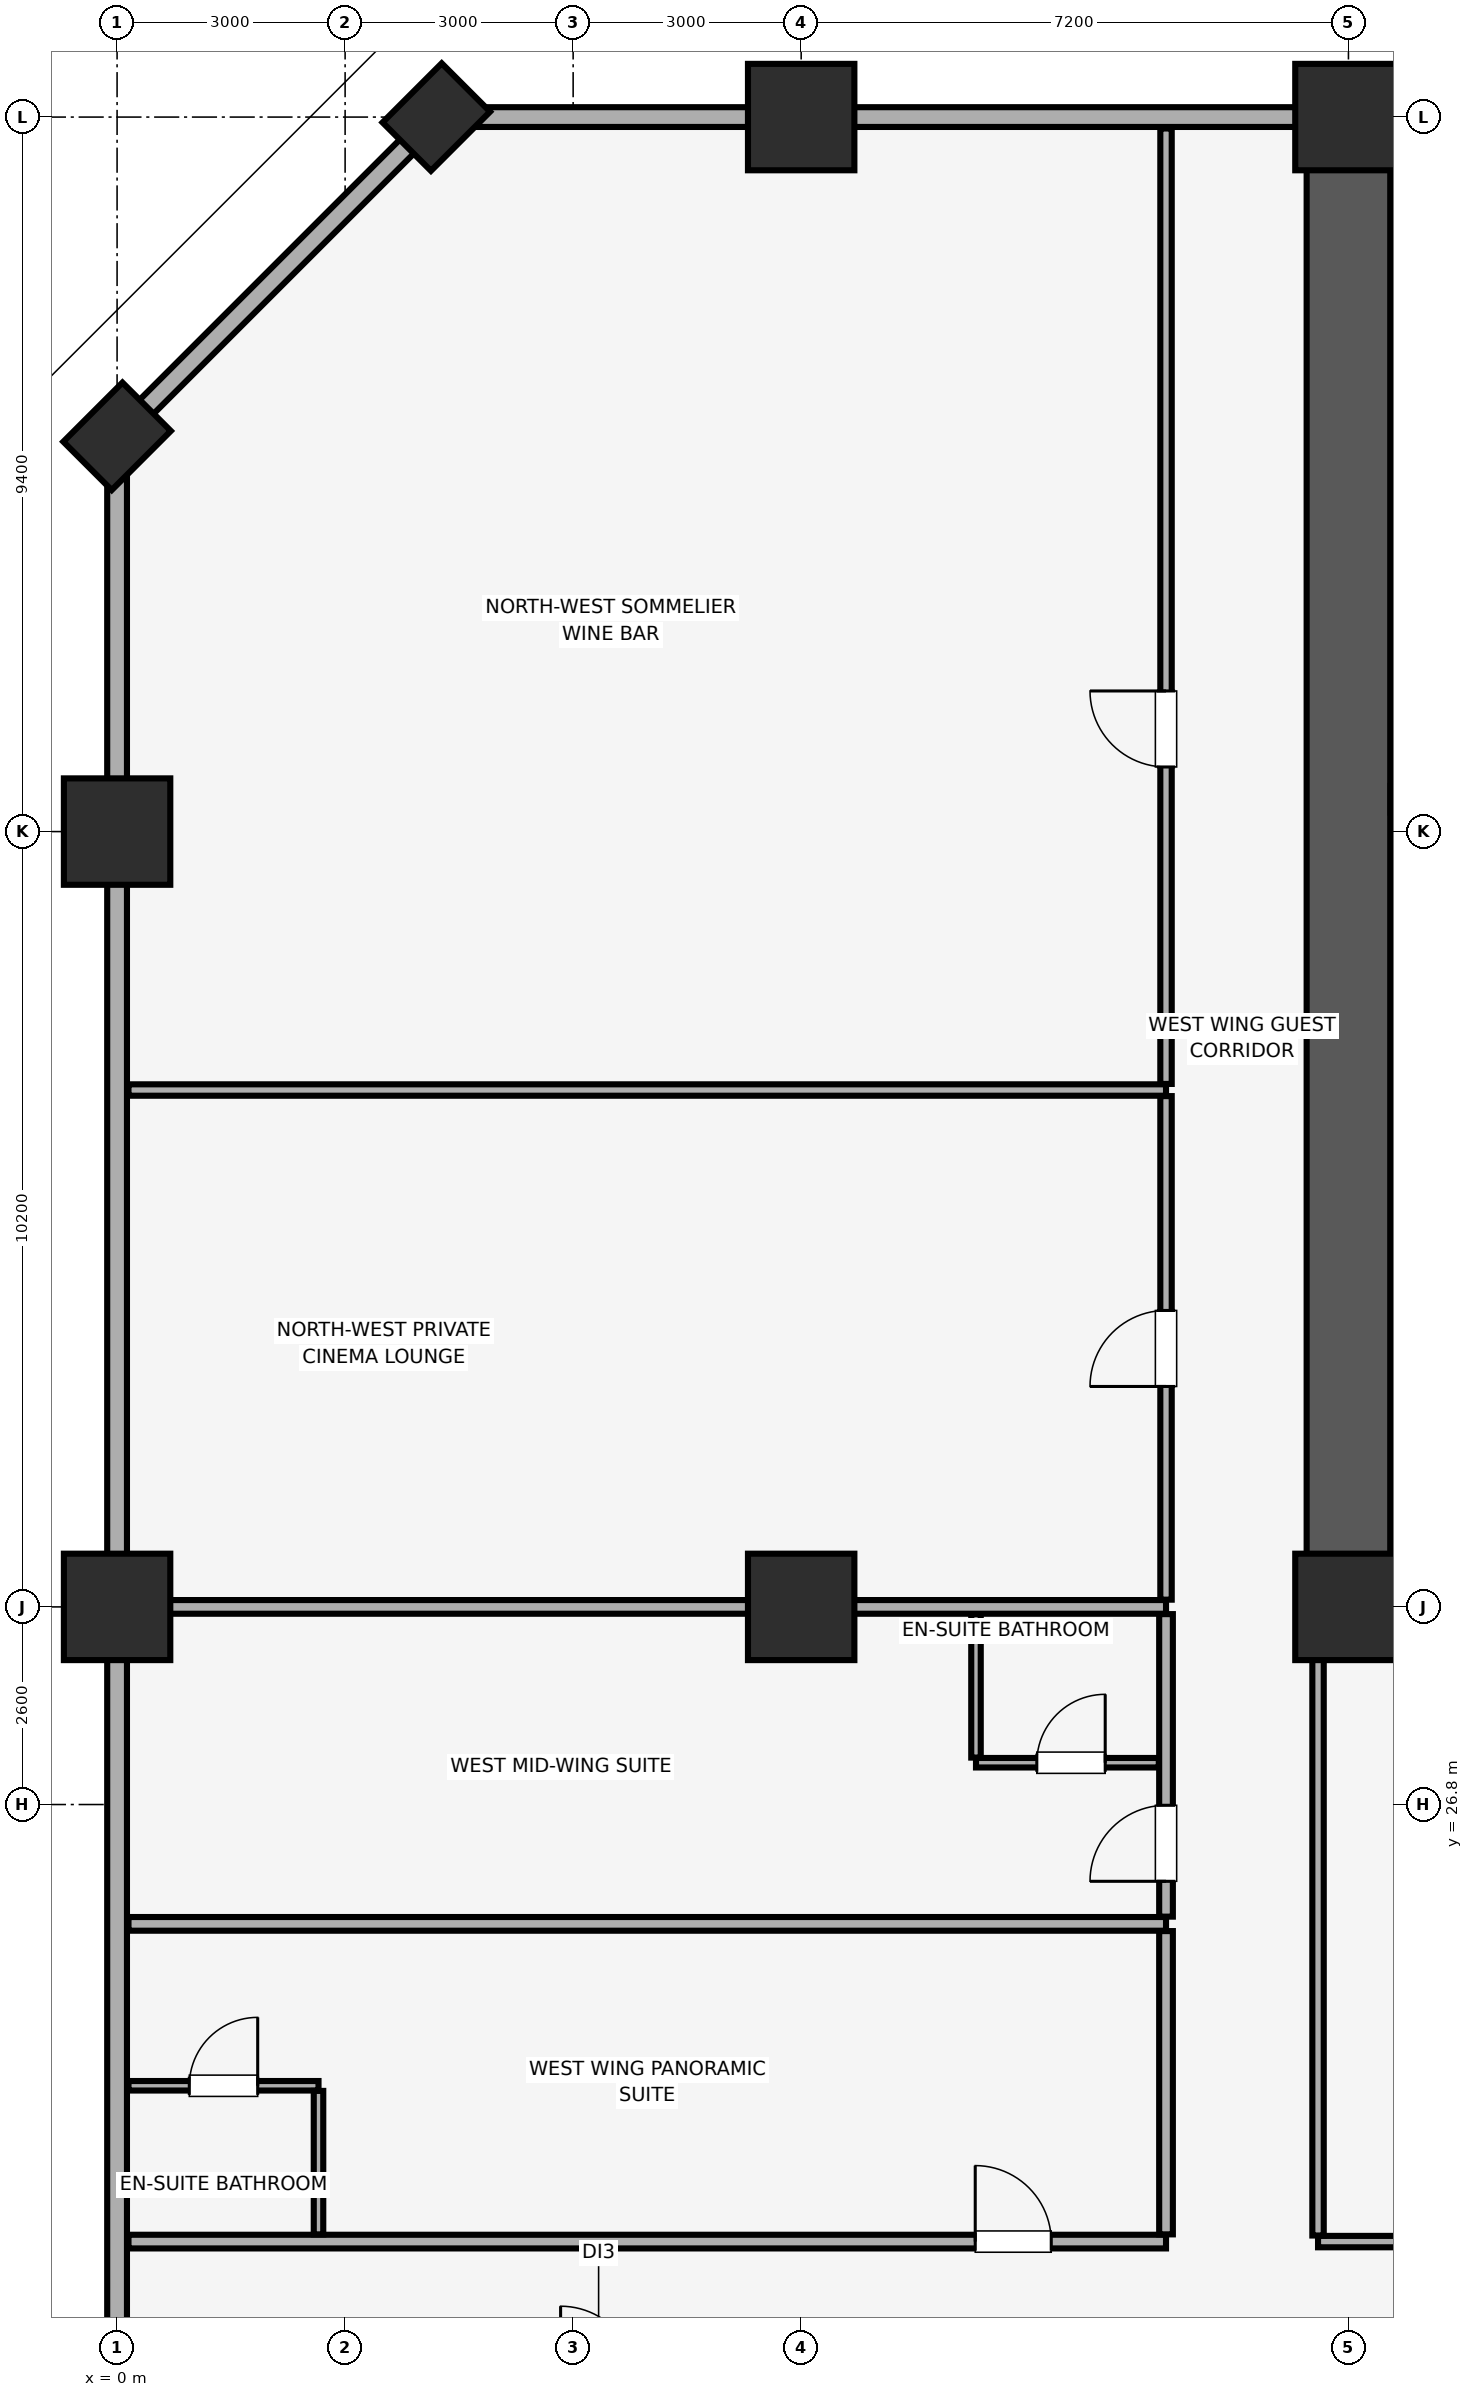
"""IFC4 building model, lengths in metres.
Left out: names, types, materials, properties, quantities, classifications, styles, units other than length and angle.
Written with IfcOpenShell. Run it as: python <this file> out.ifc"""

import sys

from ifc_helpers import new_model, si_unit, direction, frame, frame_2d, origin, origin_2d, place, context, subcontext, project, spatial, rectangle, extrude, element, fill, save


model = new_model("IFC4")
c1 = context("Model", 3, precision=1e-05, world=origin(), true_north=direction((0.0, 1.0)))
c2 = subcontext(c1, "Body", "Model", "MODEL_VIEW")
j1 = project(units=[si_unit("LENGTHUNIT", "METRE"), si_unit("PLANEANGLEUNIT", "RADIAN")], contexts=[c1])
p1 = place(None, origin())
s1 = spatial("IfcSite", under=j1, at=p1, CompositionType="ELEMENT")
p2 = place(p1, origin())
s2 = spatial("IfcBuilding", under=s1, at=p2, CompositionType="ELEMENT")
p3 = place(p2, frame((0.0, 0.0, 76.4)))
s3 = spatial("IfcBuildingStorey", under=s2, at=p3, CompositionType="ELEMENT", Elevation=76.4)
for number, where, z_axis, x_axis in (
    (1, (0.0, 29.4, 0.0), (0.0, 0.0, 1.0), (1.0, 0.0, 0.0)),
    (2, (0.0, 39.6, 0.0), (0.0, 0.0, 1.0), (1.0, 0.0, 0.0)),
):
    element("IfcColumn", number, at=place(p3, frame(where, z_axis=z_axis, x_axis=x_axis)), inside=s3, PredefinedType="COLUMN", context=c2, shape_type="SweptSolid", body=[
        extrude(rectangle(XDim=1.4, YDim=1.4, at=origin_2d()), origin(), (0.0, 0.0, 1.0), 3.4),
    ])
for number, where, z_axis, x_axis in (
    (3, (4.2, 49.0, 0.0), (0.0, 0.0, 1.0), (0.707, 0.707, 0.0)),
    (4, (0.0, 44.8, 0.0), (0.0, 0.0, 1.0), (0.707, 0.707, 0.0)),
):
    element("IfcColumn", number, at=place(p3, frame(where, z_axis=z_axis, x_axis=x_axis)), inside=s3, PredefinedType="PILASTER", context=c2, shape_type="SweptSolid", body=[
        extrude(rectangle(XDim=1.1, YDim=0.9, at=origin_2d()), origin(), (0.0, 0.0, 1.0), 3.4),
    ])
for number, where, z_axis, x_axis in (
    (5, (9.0, 29.4, 0.0), (0.0, 0.0, 1.0), (1.0, 0.0, 0.0)),
    (6, (9.0, 49.0, 0.0), (0.0, 0.0, 1.0), (1.0, 0.0, 0.0)),
    (7, (16.2, 29.4, 0.0), (0.0, 0.0, 1.0), (1.0, 0.0, 0.0)),
    (8, (16.2, 49.0, 0.0), (0.0, 0.0, 1.0), (1.0, 0.0, 0.0)),
):
    element("IfcColumn", number, at=place(p3, frame(where, z_axis=z_axis, x_axis=x_axis)), inside=s3, PredefinedType="COLUMN", context=c2, shape_type="SweptSolid", body=[
        extrude(rectangle(XDim=1.4, YDim=1.4, at=origin_2d()), origin(), (0.0, 0.0, 1.0), 3.4),
    ])
p4 = place(p3, frame((79.8, 49.0, 0.0), z_axis=(0.0, 0.0, 1.0), x_axis=(-1.0, 0.0, 0.0)))
e9 = element("IfcWall", 9, at=p4, inside=s3, PredefinedType="SOLIDWALL", context=c2, shape_type="SweptSolid", body=[
    extrude(rectangle(XDim=75.6, YDim=0.26, at=frame_2d((37.8, 0.0))), origin(), (0.0, 0.0, 1.0), 2.45),
])
p5 = place(p3, frame((4.2, 49.0, 0.0), z_axis=(0.0, 0.0, 1.0), x_axis=(-0.707106781187, -0.707106781187, 0.0)))
e10 = element("IfcWall", 10, at=p5, inside=s3, PredefinedType="SOLIDWALL", context=c2, shape_type="SweptSolid", body=[
    extrude(rectangle(XDim=5.94, YDim=0.26, at=frame_2d((2.97, 0.0))), origin(), (0.0, 0.0, 1.0), 2.45),
])
p6 = place(p3, frame((0.0, 44.8, 0.0), z_axis=(0.0, 0.0, 1.0), x_axis=(0.0, -1.0, 0.0)))
e11 = element("IfcWall", 11, at=p6, inside=s3, PredefinedType="SOLIDWALL", context=c2, shape_type="SweptSolid", body=[
    extrude(rectangle(XDim=40.6, YDim=0.26, at=frame_2d((20.3, 0.0))), origin(), (0.0, 0.0, 1.0), 2.45),
])
p7 = place(p3, frame((16.2, 29.4, 0.0), z_axis=(0.0, 0.0, 1.0), x_axis=(0.0, 1.0, 0.0)))
e12 = element("IfcWall", 12, at=p7, inside=s3, PredefinedType="SHEAR", context=c2, shape_type="SweptSolid", body=[
    extrude(rectangle(XDim=19.2, YDim=1.1, at=frame_2d((9.6, 0.0))), origin(), (0.0, 0.0, 1.0), 3.4),
])
p8 = place(p3, frame((16.755, 29.4, 0.0), z_axis=(0.0, 0.0, 1.0), x_axis=(1.0, 0.0, 0.0)))
e13 = element("IfcWall", 13, at=p8, inside=s3, PredefinedType="SHEAR", context=c2, shape_type="SweptSolid", body=[
    extrude(rectangle(XDim=6.845, YDim=1.1, at=frame_2d((3.423, 0.0))), origin(), (0.0, 0.0, 1.0), 3.4),
])
p9 = place(p3, frame((16.755, 40.025, 0.0), z_axis=(0.0, 0.0, 1.0), x_axis=(1.0, 0.0, 0.0)))
e14 = element("IfcWall", 14, at=p9, inside=s3, PredefinedType="SHEAR", context=c2, shape_type="SweptSolid", body=[
    extrude(rectangle(XDim=4.1, YDim=0.35, at=frame_2d((2.05, 0.0))), origin(), (0.0, 0.0, 1.0), 3.4),
])
p10 = place(p9, frame((1.71, 0.0, 0.0)))
e15 = element("IfcOpeningElement", 15, at=p10, cuts=e14, PredefinedType="OPENING", context=c2, shape_type="SweptSolid", body=[
    extrude(rectangle(XDim=1.15, YDim=2.15, at=frame_2d((0.575, 1.075))), frame((0.0, 0.185, 0.0), z_axis=(0.0, -1.0, 0.0), x_axis=(1.0, 0.0, 0.0)), (0.0, 0.0, 1.0), 0.37),
])
p11 = place(p3, frame((15.8, 21.05, 0.0), z_axis=(0.0, 0.0, 1.0), x_axis=(1.0, 0.0, 0.0)))
e16 = element("IfcWall", 16, at=p11, inside=s3, PredefinedType="PARTITIONING", context=c2, shape_type="SweptSolid", body=[
    extrude(rectangle(XDim=9.4, YDim=0.15, at=frame_2d((4.7, 0.0))), origin(), (0.0, 0.0, 1.0), 3.4),
])
p12 = place(p11, frame((4.2, 0.0, 0.0)))
e17 = element("IfcOpeningElement", 17, at=p12, cuts=e16, PredefinedType="OPENING", context=c2, shape_type="SweptSolid", body=[
    extrude(rectangle(XDim=1.0, YDim=2.15, at=frame_2d((0.5, 1.075))), frame((0.0, 0.085, 0.0), z_axis=(0.0, -1.0, 0.0), x_axis=(1.0, 0.0, 0.0)), (0.0, 0.0, 1.0), 0.17),
])
p13 = place(p3, frame((15.8, 21.13, 0.0), z_axis=(0.0, 0.0, 1.0), x_axis=(0.0, 1.0, 0.0)))
e18 = element("IfcWall", 18, at=p13, inside=s3, PredefinedType="PARTITIONING", context=c2, shape_type="SweptSolid", body=[
    extrude(rectangle(XDim=8.26, YDim=0.15, at=frame_2d((4.13, 0.0))), origin(), (0.0, 0.0, 1.0), 3.4),
])
p14 = place(p3, frame((0.15, 21.05, 0.0), z_axis=(0.0, 0.0, 1.0), x_axis=(1.0, 0.0, 0.0)))
e19 = element("IfcWall", 19, at=p14, inside=s3, PredefinedType="PARTITIONING", context=c2, shape_type="SweptSolid", body=[
    extrude(rectangle(XDim=13.65, YDim=0.18, at=frame_2d((6.825, 0.0))), origin(), (0.0, 0.0, 1.0), 3.4),
])
p15 = place(p14, frame((11.14, 0.0, 0.0)))
e20 = element("IfcOpeningElement", 20, at=p15, cuts=e19, PredefinedType="OPENING", context=c2, shape_type="SweptSolid", body=[
    extrude(rectangle(XDim=1.0, YDim=2.15, at=frame_2d((0.5, 1.075))), frame((0.0, 0.1, 0.0), z_axis=(0.0, -1.0, 0.0), x_axis=(1.0, 0.0, 0.0)), (0.0, 0.0, 1.0), 0.2),
])
p16 = place(p3, frame((0.15, 25.23, 0.0), z_axis=(0.0, 0.0, 1.0), x_axis=(1.0, 0.0, 0.0)))
e21 = element("IfcWall", 21, at=p16, inside=s3, PredefinedType="PARTITIONING", context=c2, shape_type="SweptSolid", body=[
    extrude(rectangle(XDim=13.65, YDim=0.18, at=frame_2d((6.825, 0.0))), origin(), (0.0, 0.0, 1.0), 3.4),
])
p17 = place(p3, frame((13.8, 21.145, 0.0), z_axis=(0.0, 0.0, 1.0), x_axis=(0.0, 1.0, 0.0)))
e22 = element("IfcWall", 22, at=p17, inside=s3, PredefinedType="PARTITIONING", context=c2, shape_type="SweptSolid", body=[
    extrude(rectangle(XDim=3.99, YDim=0.18, at=frame_2d((1.995, 0.0))), origin(), (0.0, 0.0, 1.0), 3.4),
])
p18 = place(p3, frame((0.15, 23.1, 0.0), z_axis=(0.0, 0.0, 1.0), x_axis=(1.0, 0.0, 0.0)))
e23 = element("IfcWall", 23, at=p18, inside=s3, PredefinedType="PARTITIONING", context=c2, shape_type="SweptSolid", body=[
    extrude(rectangle(XDim=2.5, YDim=0.125, at=frame_2d((1.25, 0.0))), origin(), (0.0, 0.0, 1.0), 3.4),
])
p19 = place(p18, frame((0.8, 0.0, 0.0)))
e24 = element("IfcOpeningElement", 24, at=p19, cuts=e23, PredefinedType="OPENING", context=c2, shape_type="SweptSolid", body=[
    extrude(rectangle(XDim=0.9, YDim=2.1, at=frame_2d((0.45, 1.05))), frame((0.0, 0.073, 0.0), z_axis=(0.0, -1.0, 0.0), x_axis=(1.0, 0.0, 0.0)), (0.0, 0.0, 1.0), 0.145),
])
p20 = place(p3, frame((2.65, 21.145, 0.0), z_axis=(0.0, 0.0, 1.0), x_axis=(0.0, 1.0, 0.0)))
e25 = element("IfcWall", 25, at=p20, inside=s3, PredefinedType="PARTITIONING", context=c2, shape_type="SweptSolid", body=[
    extrude(rectangle(XDim=1.887, YDim=0.125, at=frame_2d((0.944, 0.0))), origin(), (0.0, 0.0, 1.0), 3.4),
])
p21 = place(p3, frame((0.15, 29.4, 0.0), z_axis=(0.0, 0.0, 1.0), x_axis=(1.0, 0.0, 0.0)))
e26 = element("IfcWall", 26, at=p21, inside=s3, PredefinedType="PARTITIONING", context=c2, shape_type="SweptSolid", body=[
    extrude(rectangle(XDim=13.65, YDim=0.18, at=frame_2d((6.825, 0.0))), origin(), (0.0, 0.0, 1.0), 2.49),
])
p22 = place(p3, frame((13.8, 25.325, 0.0), z_axis=(0.0, 0.0, 1.0), x_axis=(0.0, 1.0, 0.0)))
e27 = element("IfcWall", 27, at=p22, inside=s3, PredefinedType="PARTITIONING", context=c2, shape_type="SweptSolid", body=[
    extrude(rectangle(XDim=3.98, YDim=0.18, at=frame_2d((1.99, 0.0))), origin(), (0.0, 0.0, 1.0), 3.4),
])
p23 = place(p22, frame((0.465, 0.0, 0.0)))
e28 = element("IfcOpeningElement", 28, at=p23, cuts=e27, PredefinedType="OPENING", context=c2, shape_type="SweptSolid", body=[
    extrude(rectangle(XDim=1.0, YDim=2.15, at=frame_2d((0.5, 1.075))), frame((0.0, 0.1, 0.0), z_axis=(0.0, -1.0, 0.0), x_axis=(1.0, 0.0, 0.0)), (0.0, 0.0, 1.0), 0.2),
])
p24 = place(p3, frame((11.3, 27.35, 0.0), z_axis=(0.0, 0.0, 1.0), x_axis=(1.0, 0.0, 0.0)))
e29 = element("IfcWall", 29, at=p24, inside=s3, PredefinedType="PARTITIONING", context=c2, shape_type="SweptSolid", body=[
    extrude(rectangle(XDim=2.405, YDim=0.125, at=frame_2d((1.203, 0.0))), origin(), (0.0, 0.0, 1.0), 3.4),
])
p25 = place(p24, frame((0.8, 0.0, 0.0)))
e30 = element("IfcOpeningElement", 30, at=p25, cuts=e29, PredefinedType="OPENING", context=c2, shape_type="SweptSolid", body=[
    extrude(rectangle(XDim=0.9, YDim=2.1, at=frame_2d((0.45, 1.05))), frame((0.0, 0.073, 0.0), z_axis=(0.0, -1.0, 0.0), x_axis=(1.0, 0.0, 0.0)), (0.0, 0.0, 1.0), 0.145),
])
p26 = place(p3, frame((11.3, 27.417, 0.0), z_axis=(0.0, 0.0, 1.0), x_axis=(0.0, 1.0, 0.0)))
e31 = element("IfcWall", 31, at=p26, inside=s3, PredefinedType="PARTITIONING", context=c2, shape_type="SweptSolid", body=[
    extrude(rectangle(XDim=1.887, YDim=0.125, at=frame_2d((0.944, 0.0))), origin(), (0.0, 0.0, 1.0), 3.4),
])
p27 = place(p3, frame((0.15, 36.2, 0.0), z_axis=(0.0, 0.0, 1.0), x_axis=(1.0, 0.0, 0.0)))
e32 = element("IfcWall", 32, at=p27, inside=s3, PredefinedType="PARTITIONING", context=c2, shape_type="SweptSolid", body=[
    extrude(rectangle(XDim=13.65, YDim=0.15, at=frame_2d((6.825, 0.0))), origin(), (0.0, 0.0, 1.0), 3.4),
])
p28 = place(p3, frame((13.8, 29.495, 0.0), z_axis=(0.0, 0.0, 1.0), x_axis=(0.0, 1.0, 0.0)))
e33 = element("IfcWall", 33, at=p28, inside=s3, PredefinedType="PARTITIONING", context=c2, shape_type="SweptSolid", body=[
    extrude(rectangle(XDim=6.625, YDim=0.15, at=frame_2d((3.312, 0.0))), origin(), (0.0, 0.0, 1.0), 3.4),
])
p29 = place(p28, frame((2.805, 0.0, 0.0)))
e34 = element("IfcOpeningElement", 34, at=p29, cuts=e33, PredefinedType="OPENING", context=c2, shape_type="SweptSolid", body=[
    extrude(rectangle(XDim=1.0, YDim=2.15, at=frame_2d((0.5, 1.075))), frame((0.0, 0.085, 0.0), z_axis=(0.0, -1.0, 0.0), x_axis=(1.0, 0.0, 0.0)), (0.0, 0.0, 1.0), 0.17),
])
p30 = place(p3, frame((13.8, 36.28, 0.0), z_axis=(0.0, 0.0, 1.0), x_axis=(0.0, 1.0, 0.0)))
e35 = element("IfcWall", 35, at=p30, inside=s3, PredefinedType="PARTITIONING", context=c2, shape_type="SweptSolid", body=[
    extrude(rectangle(XDim=12.57, YDim=0.15, at=frame_2d((6.285, 0.0))), origin(), (0.0, 0.0, 1.0), 3.4),
])
p31 = place(p30, frame((4.17, 0.0, 0.0)))
e36 = element("IfcOpeningElement", 36, at=p31, cuts=e35, PredefinedType="OPENING", context=c2, shape_type="SweptSolid", body=[
    extrude(rectangle(XDim=1.0, YDim=2.15, at=frame_2d((0.5, 1.075))), frame((0.0, 0.085, 0.0), z_axis=(0.0, -1.0, 0.0), x_axis=(1.0, 0.0, 0.0)), (0.0, 0.0, 1.0), 0.17),
])
p32 = place(p15, origin())
e37 = element("IfcDoor", 37, at=p32, inside=s3, OperationType="SINGLE_SWING_LEFT", PredefinedType="DOOR", context=c2, shape_type="SweptSolid", body=[
    extrude(rectangle(XDim=1.0, YDim=2.15, at=frame_2d((0.5, 1.075))), frame((0.0, 0.025, 0.0), z_axis=(0.0, -1.0, 0.0), x_axis=(1.0, 0.0, 0.0)), (0.0, 0.0, 1.0), 0.05),
])
fill(e20, e37)
p33 = place(p19, origin())
e38 = element("IfcDoor", 38, at=p33, inside=s3, OperationType="SINGLE_SWING_RIGHT", PredefinedType="DOOR", context=c2, shape_type="SweptSolid", body=[
    extrude(rectangle(XDim=0.9, YDim=2.1, at=frame_2d((0.45, 1.05))), frame((0.0, 0.025, 0.0), z_axis=(0.0, -1.0, 0.0), x_axis=(1.0, 0.0, 0.0)), (0.0, 0.0, 1.0), 0.05),
])
fill(e24, e38)
p34 = place(p23, origin())
e39 = element("IfcDoor", 39, at=p34, inside=s3, OperationType="SINGLE_SWING_LEFT", PredefinedType="DOOR", context=c2, shape_type="SweptSolid", body=[
    extrude(rectangle(XDim=1.0, YDim=2.15, at=frame_2d((0.5, 1.075))), frame((0.0, 0.025, 0.0), z_axis=(0.0, -1.0, 0.0), x_axis=(1.0, 0.0, 0.0)), (0.0, 0.0, 1.0), 0.05),
])
fill(e28, e39)
p35 = place(p25, origin())
e40 = element("IfcDoor", 40, at=p35, inside=s3, OperationType="SINGLE_SWING_RIGHT", PredefinedType="DOOR", context=c2, shape_type="SweptSolid", body=[
    extrude(rectangle(XDim=0.9, YDim=2.1, at=frame_2d((0.45, 1.05))), frame((0.0, 0.025, 0.0), z_axis=(0.0, -1.0, 0.0), x_axis=(1.0, 0.0, 0.0)), (0.0, 0.0, 1.0), 0.05),
])
fill(e30, e40)
p36 = place(p29, origin())
e41 = element("IfcDoor", 41, at=p36, inside=s3, OperationType="SINGLE_SWING_LEFT", PredefinedType="DOOR", context=c2, shape_type="SweptSolid", body=[
    extrude(rectangle(XDim=1.0, YDim=2.15, at=frame_2d((0.5, 1.075))), frame((0.0, 0.025, 0.0), z_axis=(0.0, -1.0, 0.0), x_axis=(1.0, 0.0, 0.0)), (0.0, 0.0, 1.0), 0.05),
])
fill(e34, e41)
p37 = place(p31, origin())
e42 = element("IfcDoor", 42, at=p37, inside=s3, OperationType="SINGLE_SWING_RIGHT", PredefinedType="DOOR", context=c2, shape_type="SweptSolid", body=[
    extrude(rectangle(XDim=1.0, YDim=2.15, at=frame_2d((0.5, 1.075))), frame((0.0, 0.025, 0.0), z_axis=(0.0, -1.0, 0.0), x_axis=(1.0, 0.0, 0.0)), (0.0, 0.0, 1.0), 0.05),
])
fill(e36, e42)
save(model, sys.argv[1])
